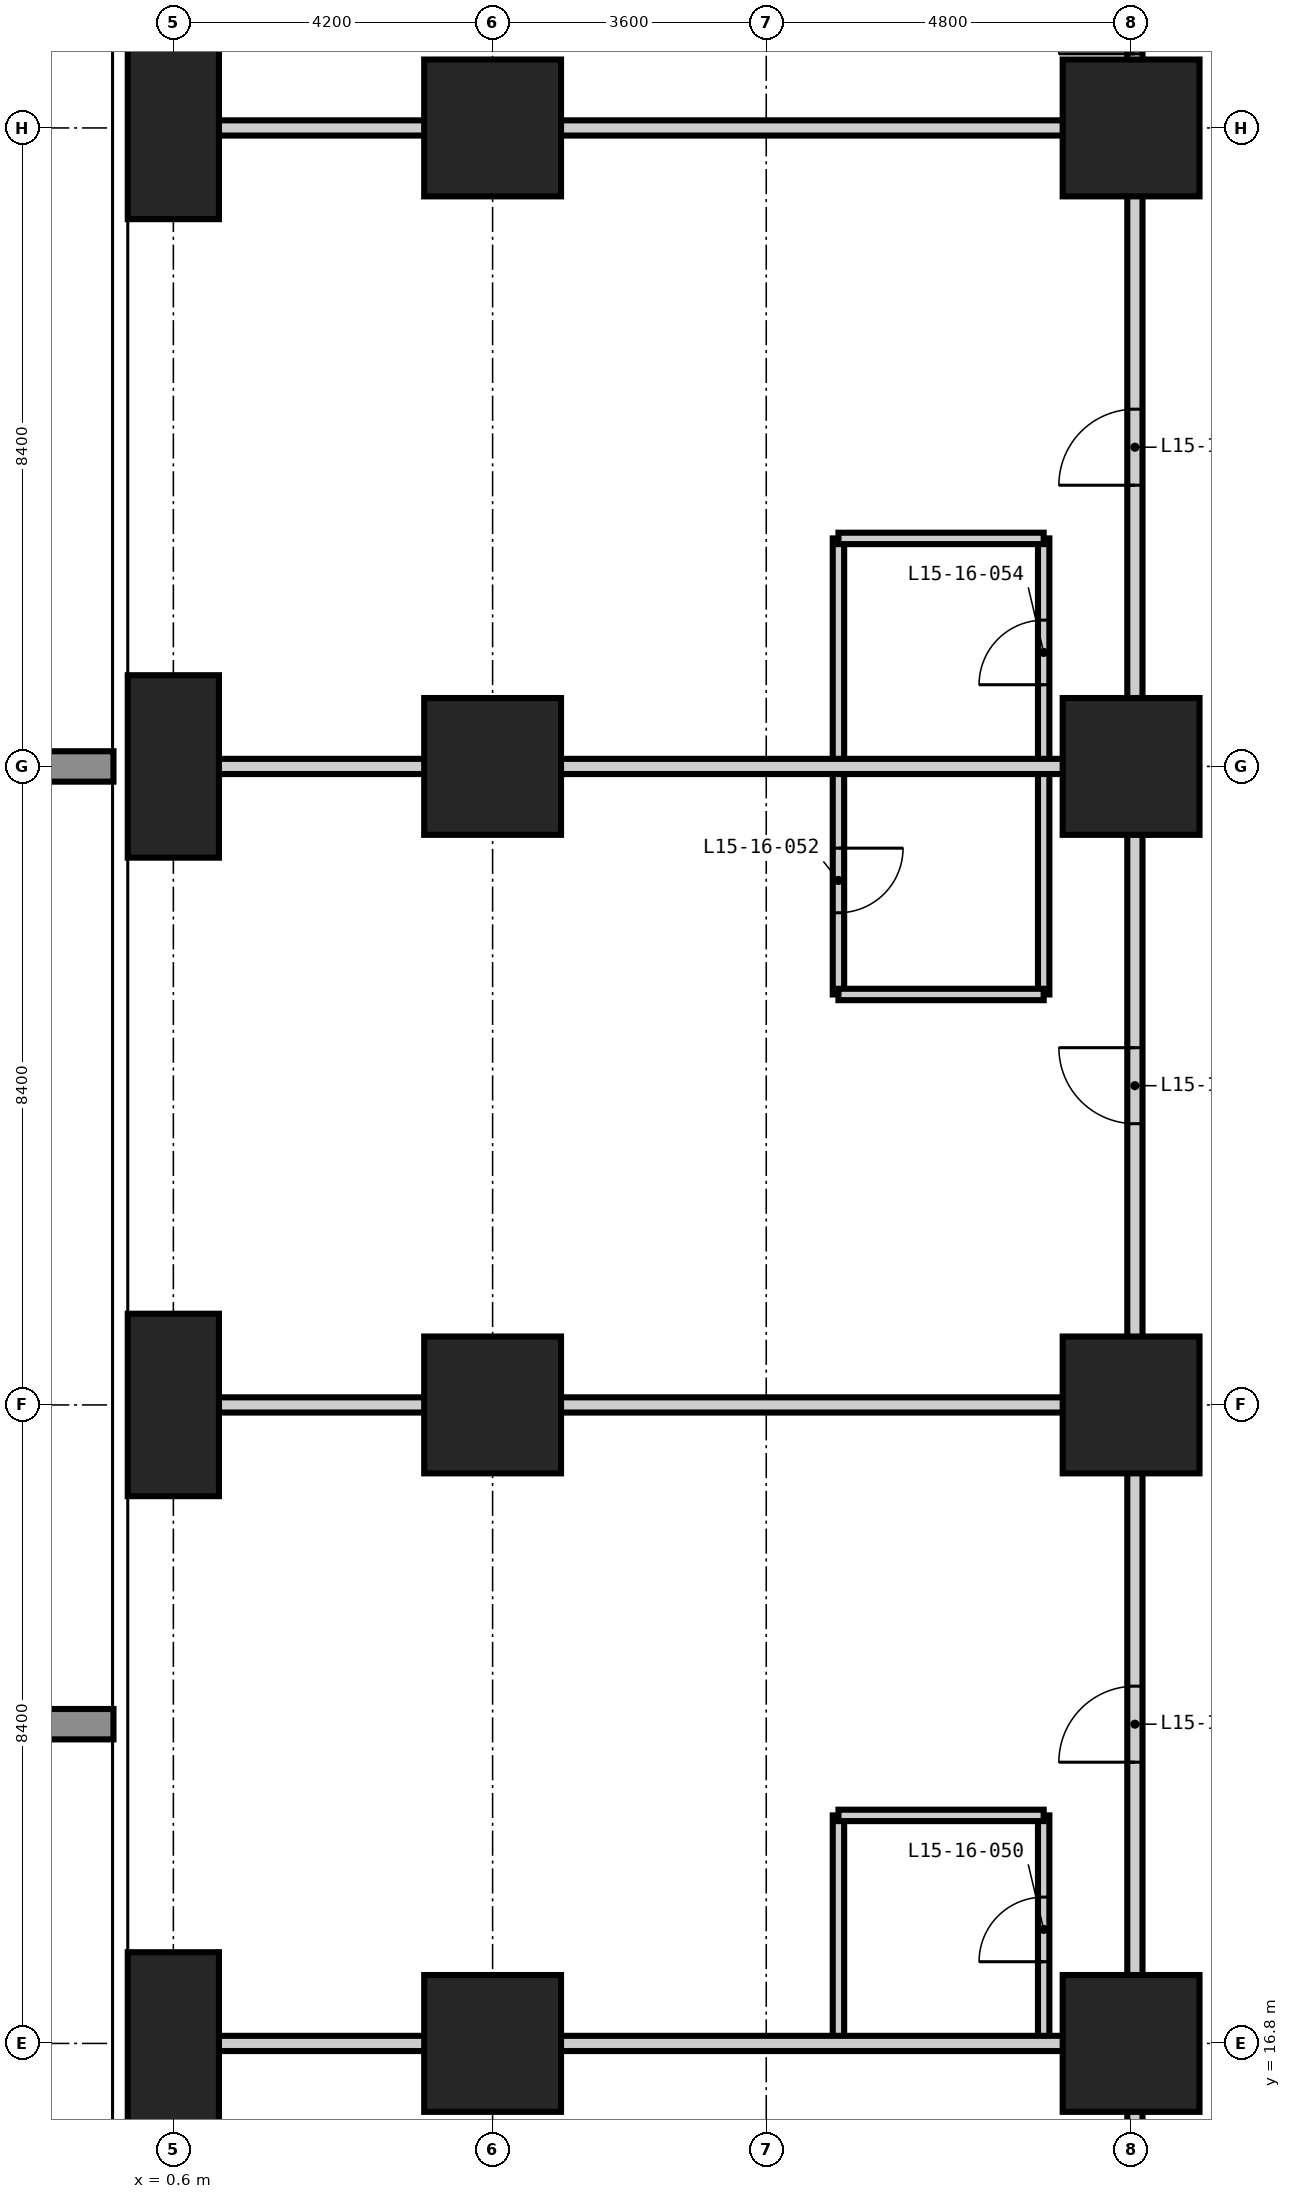
"""IFC4 building model, lengths in metres.
Left out: names, types, materials, properties, quantities, classifications, styles, units other than length and angle.
Written with IfcOpenShell. Run it as: python <this file> out.ifc"""

import sys

from ifc_helpers import new_model, si_unit, direction, frame, frame_2d, origin, origin_2d, place, context, subcontext, project, spatial, rectangle, extrude, element, fill, save


model = new_model("IFC4")
c1 = context("Model", 3, precision=1e-05, world=origin(), true_north=direction((0.0, 1.0)))
c2 = subcontext(c1, "Body", "Model", "MODEL_VIEW")
j1 = project(units=[si_unit("LENGTHUNIT", "METRE"), si_unit("PLANEANGLEUNIT", "RADIAN")], contexts=[c1])
p1 = place(None, origin())
s1 = spatial("IfcSite", under=j1, at=p1, CompositionType="ELEMENT")
p2 = place(p1, origin())
s2 = spatial("IfcBuilding", under=s1, at=p2, CompositionType="ELEMENT")
p3 = place(p2, frame((0.0, 0.0, 63.0)))
s3 = spatial("IfcBuildingStorey", under=s2, at=p3, CompositionType="ELEMENT", Elevation=63.0)
for number, where, z_axis, x_axis in (
    (1, (0.6, 16.8, -0.35), (0.0, 0.0, 1.0), (1.0, 0.0, 0.0)),
    (2, (0.6, 25.2, -0.35), (0.0, 0.0, 1.0), (1.0, 0.0, 0.0)),
    (3, (0.6, 33.6, -0.35), (0.0, 0.0, 1.0), (1.0, 0.0, 0.0)),
    (4, (0.6, 42.0, -0.35), (0.0, 0.0, 1.0), (1.0, 0.0, 0.0)),
):
    element("IfcColumn", number, at=place(p3, frame(where, z_axis=z_axis, x_axis=x_axis)), inside=s3, PredefinedType="COLUMN", context=c2, shape_type="SweptSolid", body=[
        extrude(rectangle(XDim=1.2, YDim=2.4, at=origin_2d()), origin(), (0.0, 0.0, 1.0), 3.6),
    ])
for number, where, z_axis, x_axis in (
    (5, (4.8, 16.8, -0.35), (0.0, 0.0, 1.0), (1.0, 0.0, 0.0)),
    (6, (4.8, 25.2, -0.35), (0.0, 0.0, 1.0), (1.0, 0.0, 0.0)),
    (7, (4.8, 33.6, -0.35), (0.0, 0.0, 1.0), (1.0, 0.0, 0.0)),
    (8, (4.8, 42.0, -0.35), (0.0, 0.0, 1.0), (1.0, 0.0, 0.0)),
    (9, (13.2, 16.8, -0.35), (0.0, 0.0, 1.0), (1.0, 0.0, 0.0)),
    (10, (13.2, 25.2, -0.35), (0.0, 0.0, 1.0), (1.0, 0.0, 0.0)),
    (11, (13.2, 33.6, -0.35), (0.0, 0.0, 1.0), (1.0, 0.0, 0.0)),
    (12, (13.2, 42.0, -0.35), (0.0, 0.0, 1.0), (1.0, 0.0, 0.0)),
):
    element("IfcColumn", number, at=place(p3, frame(where, z_axis=z_axis, x_axis=x_axis)), inside=s3, PredefinedType="COLUMN", context=c2, shape_type="SweptSolid", body=[
        extrude(rectangle(XDim=1.8, YDim=1.8, at=origin_2d()), origin(), (0.0, 0.0, 1.0), 3.6),
    ])
p4 = place(p3, frame((9.35, 16.8, 0.0), z_axis=(0.0, 0.0, 1.0), x_axis=(0.0, 1.0, 0.0)))
e13 = element("IfcWall", 13, at=p4, inside=s3, PredefinedType="PARTITIONING", context=c2, shape_type="SweptSolid", body=[
    extrude(rectangle(XDim=3.0, YDim=0.15, at=frame_2d((1.5, 0.0))), origin(), (0.0, 0.0, 1.0), 3.25),
])
p5 = place(p3, frame((9.35, 30.6, 0.0), z_axis=(0.0, 0.0, 1.0), x_axis=(0.0, 1.0, 0.0)))
e14 = element("IfcWall", 14, at=p5, inside=s3, PredefinedType="PARTITIONING", context=c2, shape_type="SweptSolid", body=[
    extrude(rectangle(XDim=6.0, YDim=0.15, at=frame_2d((3.0, 0.0))), origin(), (0.0, 0.0, 1.0), 3.25),
])
p6 = place(p5, frame((1.075, 0.0, 0.0)))
e15 = element("IfcOpeningElement", 15, at=p6, cuts=e14, PredefinedType="OPENING", context=c2, shape_type="SweptSolid", body=[
    extrude(rectangle(XDim=0.85, YDim=2.1, at=frame_2d((0.425, 1.05))), frame((0.0, 0.085, 0.0), z_axis=(0.0, -1.0, 0.0), x_axis=(1.0, 0.0, 0.0)), (0.0, 0.0, 1.0), 0.17),
])
p7 = place(p3, frame((12.05, 16.8, 0.0), z_axis=(0.0, 0.0, 1.0), x_axis=(0.0, 1.0, 0.0)))
e16 = element("IfcWall", 16, at=p7, inside=s3, PredefinedType="PARTITIONING", context=c2, shape_type="SweptSolid", body=[
    extrude(rectangle(XDim=3.0, YDim=0.15, at=frame_2d((1.5, 0.0))), origin(), (0.0, 0.0, 1.0), 3.25),
])
p8 = place(p7, frame((1.075, 0.0, 0.0)))
e17 = element("IfcOpeningElement", 17, at=p8, cuts=e16, PredefinedType="OPENING", context=c2, shape_type="SweptSolid", body=[
    extrude(rectangle(XDim=0.85, YDim=2.1, at=frame_2d((0.425, 1.05))), frame((0.0, 0.085, 0.0), z_axis=(0.0, -1.0, 0.0), x_axis=(1.0, 0.0, 0.0)), (0.0, 0.0, 1.0), 0.17),
])
p9 = place(p3, frame((12.05, 30.6, 0.0), z_axis=(0.0, 0.0, 1.0), x_axis=(0.0, 1.0, 0.0)))
e18 = element("IfcWall", 18, at=p9, inside=s3, PredefinedType="PARTITIONING", context=c2, shape_type="SweptSolid", body=[
    extrude(rectangle(XDim=6.0, YDim=0.15, at=frame_2d((3.0, 0.0))), origin(), (0.0, 0.0, 1.0), 3.25),
])
p10 = place(p9, frame((4.075, 0.0, 0.0)))
e19 = element("IfcOpeningElement", 19, at=p10, cuts=e18, PredefinedType="OPENING", context=c2, shape_type="SweptSolid", body=[
    extrude(rectangle(XDim=0.85, YDim=2.1, at=frame_2d((0.425, 1.05))), frame((0.0, 0.085, 0.0), z_axis=(0.0, -1.0, 0.0), x_axis=(1.0, 0.0, 0.0)), (0.0, 0.0, 1.0), 0.17),
])
for number, where, z_axis, x_axis in (
    (20, (9.35, 19.8, 0.0), (0.0, 0.0, 1.0), (1.0, 0.0, 0.0)),
    (21, (9.35, 30.6, 0.0), (0.0, 0.0, 1.0), (1.0, 0.0, 0.0)),
    (22, (9.35, 36.6, 0.0), (0.0, 0.0, 1.0), (1.0, 0.0, 0.0)),
):
    element("IfcWall", number, at=place(p3, frame(where, z_axis=z_axis, x_axis=x_axis)), inside=s3, PredefinedType="PARTITIONING", context=c2, shape_type="SweptSolid", body=[
        extrude(rectangle(XDim=2.7, YDim=0.15, at=frame_2d((1.35, 0.0))), origin(), (0.0, 0.0, 1.0), 3.25),
    ])
p11 = place(p3, frame((13.25, 13.25, 0.0), z_axis=(0.0, 0.0, 1.0), x_axis=(0.0, 1.0, 0.0)))
e23 = element("IfcWall", 23, at=p11, inside=s3, PredefinedType="PARTITIONING", context=c2, shape_type="SweptSolid", body=[
    extrude(rectangle(XDim=31.7, YDim=0.2, at=frame_2d((15.85, 0.0))), origin(), (0.0, 0.0, 1.0), 3.25),
])
p12 = place(p11, frame((7.25, 0.0, 0.0)))
e24 = element("IfcOpeningElement", 24, at=p12, cuts=e23, PredefinedType="OPENING", context=c2, shape_type="SweptSolid", body=[
    extrude(rectangle(XDim=1.0, YDim=2.2, at=frame_2d((0.5, 1.1))), frame((0.0, 0.11, 0.0), z_axis=(0.0, -1.0, 0.0), x_axis=(1.0, 0.0, 0.0)), (0.0, 0.0, 1.0), 0.22),
])
p13 = place(p11, frame((15.65, 0.0, 0.0)))
e25 = element("IfcOpeningElement", 25, at=p13, cuts=e23, PredefinedType="OPENING", context=c2, shape_type="SweptSolid", body=[
    extrude(rectangle(XDim=1.0, YDim=2.2, at=frame_2d((0.5, 1.1))), frame((0.0, 0.11, 0.0), z_axis=(0.0, -1.0, 0.0), x_axis=(1.0, 0.0, 0.0)), (0.0, 0.0, 1.0), 0.22),
])
p14 = place(p11, frame((24.05, 0.0, 0.0)))
e26 = element("IfcOpeningElement", 26, at=p14, cuts=e23, PredefinedType="OPENING", context=c2, shape_type="SweptSolid", body=[
    extrude(rectangle(XDim=1.0, YDim=2.2, at=frame_2d((0.5, 1.1))), frame((0.0, 0.11, 0.0), z_axis=(0.0, -1.0, 0.0), x_axis=(1.0, 0.0, 0.0)), (0.0, 0.0, 1.0), 0.22),
])
p15 = place(p11, frame((1.275, 0.0, 0.0)))
e27 = element("IfcOpeningElement", 27, at=p15, cuts=e23, PredefinedType="OPENING", context=c2, shape_type="SweptSolid", body=[
    extrude(rectangle(XDim=1.0, YDim=2.2, at=frame_2d((0.5, 1.1))), frame((0.0, 0.11, 0.0), z_axis=(0.0, -1.0, 0.0), x_axis=(1.0, 0.0, 0.0)), (0.0, 0.0, 1.0), 0.22),
])
p16 = place(p11, frame((29.725, 0.0, 0.0)))
e28 = element("IfcOpeningElement", 28, at=p16, cuts=e23, PredefinedType="OPENING", context=c2, shape_type="SweptSolid", body=[
    extrude(rectangle(XDim=1.0, YDim=2.2, at=frame_2d((0.5, 1.1))), frame((0.0, 0.11, 0.0), z_axis=(0.0, -1.0, 0.0), x_axis=(1.0, 0.0, 0.0)), (0.0, 0.0, 1.0), 0.22),
])
for number, where, z_axis, x_axis in (
    (29, (-0.008, 16.8, 0.0), (0.0, 0.0, 1.0), (1.0, 0.0, 0.0)),
    (30, (-0.008, 25.2, 0.0), (0.0, 0.0, 1.0), (1.0, 0.0, 0.0)),
    (31, (-0.008, 33.6, 0.0), (0.0, 0.0, 1.0), (1.0, 0.0, 0.0)),
    (32, (-0.008, 42.0, 0.0), (0.0, 0.0, 1.0), (1.0, 0.0, 0.0)),
):
    element("IfcWall", number, at=place(p3, frame(where, z_axis=z_axis, x_axis=x_axis)), inside=s3, PredefinedType="PARTITIONING", context=c2, shape_type="SweptSolid", body=[
        extrude(rectangle(XDim=13.258, YDim=0.2, at=frame_2d((6.629, 0.0))), origin(), (0.0, 0.0, 1.0), 3.25),
    ])
p17 = place(p12, origin())
e33 = element("IfcDoor", 33, at=p17, inside=s3, OperationType="SINGLE_SWING_LEFT", PredefinedType="DOOR", context=c2, shape_type="SweptSolid", body=[
    extrude(rectangle(XDim=1.0, YDim=2.2, at=frame_2d((0.5, 1.1))), frame((0.0, 0.025, 0.0), z_axis=(0.0, -1.0, 0.0), x_axis=(1.0, 0.0, 0.0)), (0.0, 0.0, 1.0), 0.05),
])
fill(e24, e33)
p18 = place(p8, origin())
e34 = element("IfcDoor", 34, at=p18, inside=s3, OperationType="SINGLE_SWING_LEFT", PredefinedType="DOOR", context=c2, shape_type="SweptSolid", body=[
    extrude(rectangle(XDim=0.85, YDim=2.1, at=frame_2d((0.425, 1.05))), frame((0.0, 0.025, 0.0), z_axis=(0.0, -1.0, 0.0), x_axis=(1.0, 0.0, 0.0)), (0.0, 0.0, 1.0), 0.05),
])
fill(e17, e34)
p19 = place(p13, origin())
e35 = element("IfcDoor", 35, at=p19, inside=s3, OperationType="SINGLE_SWING_RIGHT", PredefinedType="DOOR", context=c2, shape_type="SweptSolid", body=[
    extrude(rectangle(XDim=1.0, YDim=2.2, at=frame_2d((0.5, 1.1))), frame((0.0, 0.025, 0.0), z_axis=(0.0, -1.0, 0.0), x_axis=(1.0, 0.0, 0.0)), (0.0, 0.0, 1.0), 0.05),
])
fill(e25, e35)
p20 = place(p6, frame((0.85, 0.0, 0.0), z_axis=(0.0, 0.0, 1.0), x_axis=(-1.0, 0.0, 0.0)))
e36 = element("IfcDoor", 36, at=p20, inside=s3, OperationType="SINGLE_SWING_LEFT", PredefinedType="DOOR", context=c2, shape_type="SweptSolid", body=[
    extrude(rectangle(XDim=0.85, YDim=2.1, at=frame_2d((0.425, 1.05))), frame((0.0, 0.025, 0.0), z_axis=(0.0, -1.0, 0.0), x_axis=(1.0, 0.0, 0.0)), (0.0, 0.0, 1.0), 0.05),
])
fill(e15, e36)
p21 = place(p14, origin())
e37 = element("IfcDoor", 37, at=p21, inside=s3, OperationType="SINGLE_SWING_LEFT", PredefinedType="DOOR", context=c2, shape_type="SweptSolid", body=[
    extrude(rectangle(XDim=1.0, YDim=2.2, at=frame_2d((0.5, 1.1))), frame((0.0, 0.025, 0.0), z_axis=(0.0, -1.0, 0.0), x_axis=(1.0, 0.0, 0.0)), (0.0, 0.0, 1.0), 0.05),
])
fill(e26, e37)
p22 = place(p10, origin())
e38 = element("IfcDoor", 38, at=p22, inside=s3, OperationType="SINGLE_SWING_LEFT", PredefinedType="DOOR", context=c2, shape_type="SweptSolid", body=[
    extrude(rectangle(XDim=0.85, YDim=2.1, at=frame_2d((0.425, 1.05))), frame((0.0, 0.025, 0.0), z_axis=(0.0, -1.0, 0.0), x_axis=(1.0, 0.0, 0.0)), (0.0, 0.0, 1.0), 0.05),
])
fill(e19, e38)
p23 = place(p16, origin())
e39 = element("IfcDoor", 39, at=p23, inside=s3, OperationType="SINGLE_SWING_LEFT", PredefinedType="DOOR", context=c2, shape_type="SweptSolid", body=[
    extrude(rectangle(XDim=1.0, YDim=2.2, at=frame_2d((0.5, 1.1))), frame((0.0, 0.025, 0.0), z_axis=(0.0, -1.0, 0.0), x_axis=(1.0, 0.0, 0.0)), (0.0, 0.0, 1.0), 0.05),
])
fill(e28, e39)
save(model, sys.argv[1])
